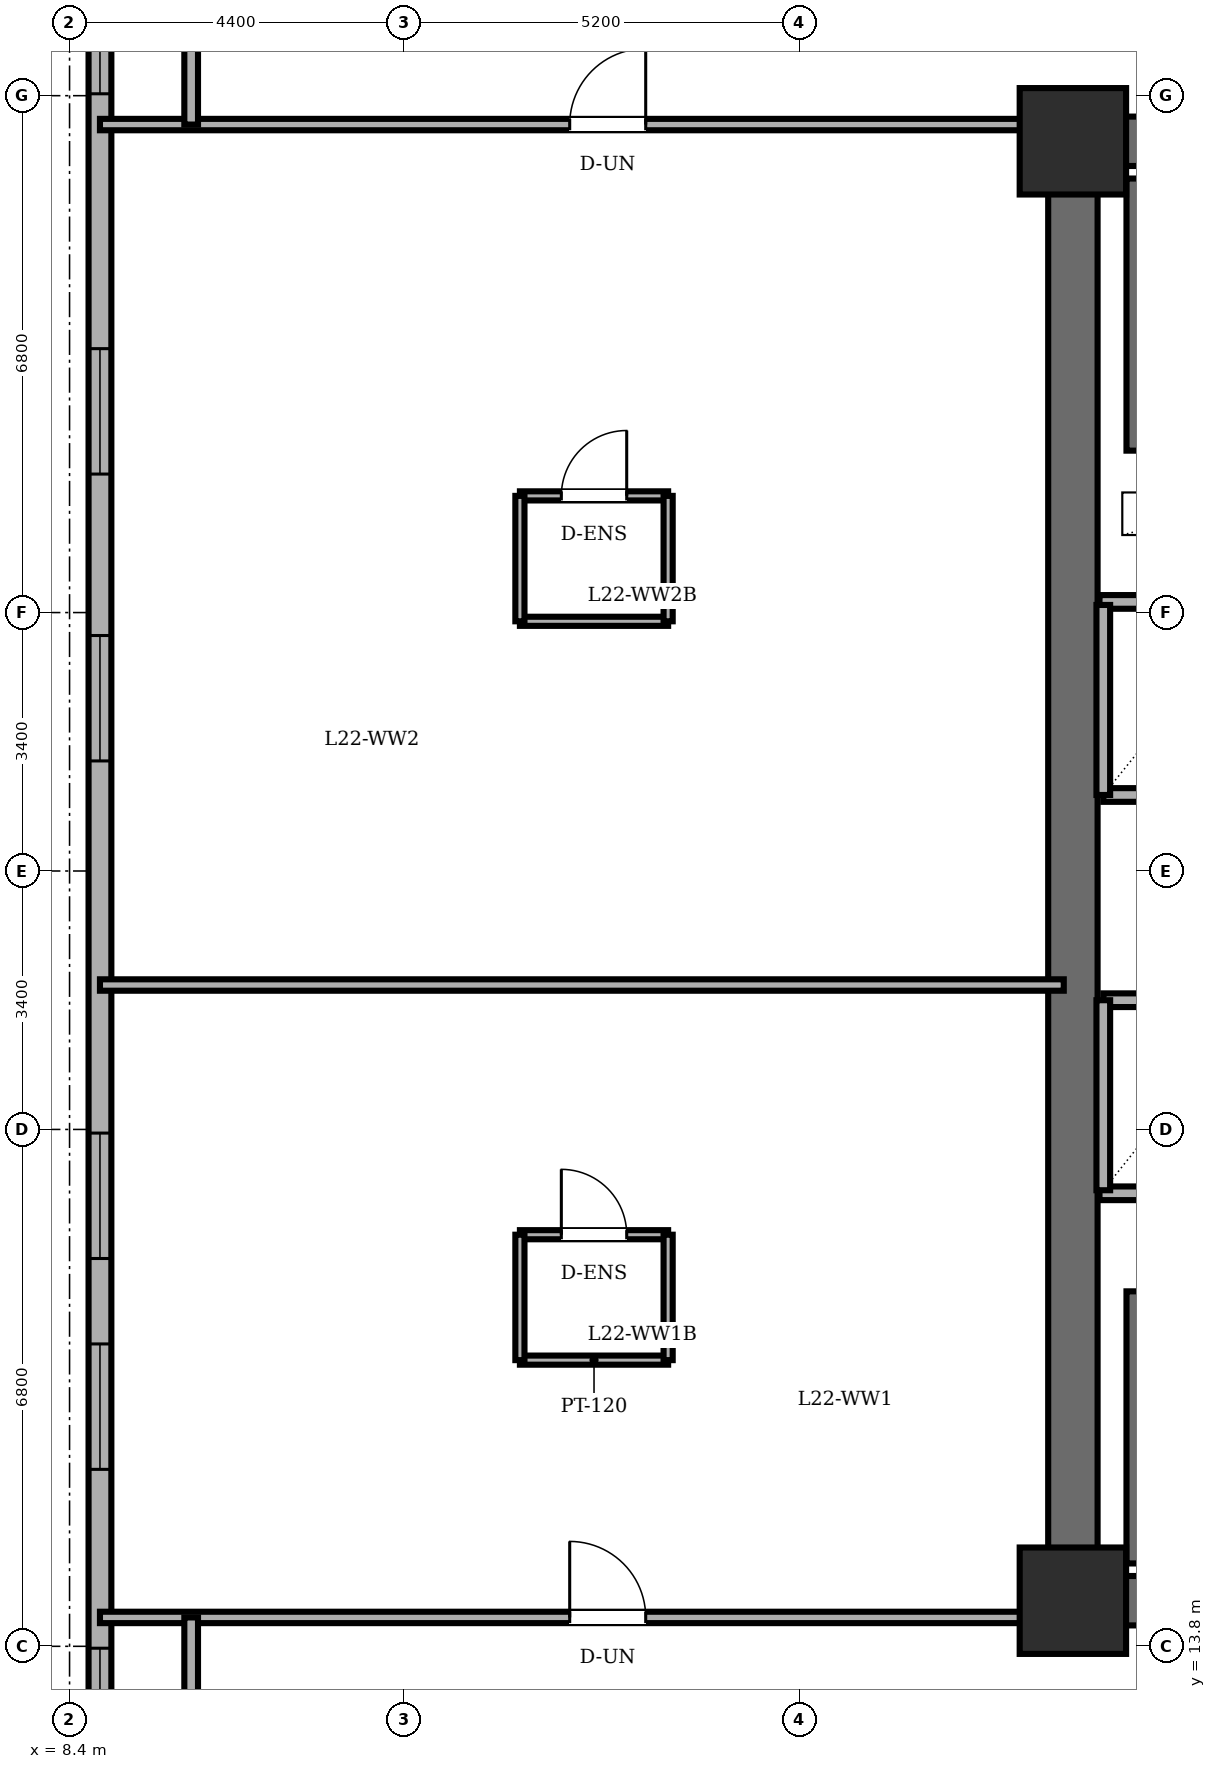
"""IFC4 building model, lengths in metres.
Left out: names, types, materials, properties, quantities, classifications, styles, units other than length and angle.
Written with IfcOpenShell. Run it as: python <this file> out.ifc"""

import sys

from ifc_helpers import new_model, si_unit, direction, frame, frame_2d, origin, origin_2d, place, context, subcontext, project, spatial, rectangle, extrude, element, fill, save


model = new_model("IFC4")
c1 = context("Model", 3, precision=1e-05, world=origin(), true_north=direction((0.0, 1.0)))
c2 = subcontext(c1, "Body", "Model", "MODEL_VIEW")
j1 = project(units=[si_unit("LENGTHUNIT", "METRE"), si_unit("PLANEANGLEUNIT", "RADIAN")], contexts=[c1])
p1 = place(None, origin())
s1 = spatial("IfcSite", under=j1, at=p1, CompositionType="ELEMENT")
p2 = place(p1, origin())
s2 = spatial("IfcBuilding", under=s1, at=p2, CompositionType="ELEMENT")
p3 = place(p2, frame((0.0, 0.0, 86.3)))
s3 = spatial("IfcBuildingStorey", under=s2, at=p3, CompositionType="ELEMENT", Elevation=86.3)
for number, where, z_axis, x_axis in (
    (1, (21.6, 14.4, 0.0), (0.0, 0.0, 1.0), (1.0, 0.0, 0.0)),
    (2, (21.6, 33.6, 0.0), (0.0, 0.0, 1.0), (1.0, 0.0, 0.0)),
):
    element("IfcColumn", number, at=place(p3, frame(where, z_axis=z_axis, x_axis=x_axis)), inside=s3, PredefinedType="COLUMN", context=c2, shape_type="SweptSolid", body=[
        extrude(rectangle(XDim=1.4, YDim=1.4, at=origin_2d()), origin(), (0.0, 0.0, 1.0), 3.6),
    ])
p4 = place(p3, frame((8.8, 38.2, 0.0), z_axis=(0.0, 0.0, 1.0), x_axis=(0.0, -1.0, 0.0)))
e3 = element("IfcWall", 3, at=p4, inside=s3, PredefinedType="SOLIDWALL", context=c2, shape_type="SweptSolid", body=[
    extrude(rectangle(XDim=28.4, YDim=0.3, at=frame_2d((14.2, 0.0))), origin(), (0.0, 0.0, 1.0), 3.4),
])
p5 = place(p4, frame((2.325, 0.0, 0.85)))
e4 = element("IfcOpeningElement", 4, at=p5, cuts=e3, PredefinedType="OPENING", context=c2, shape_type="SweptSolid", body=[
    extrude(rectangle(XDim=1.65, YDim=1.55, at=frame_2d((0.825, 0.775))), frame((0.0, 0.16, 0.0), z_axis=(0.0, -1.0, 0.0), x_axis=(1.0, 0.0, 0.0)), (0.0, 0.0, 1.0), 0.32),
])
p6 = place(p4, frame((7.328, 0.0, 0.85)))
e5 = element("IfcOpeningElement", 5, at=p6, cuts=e3, PredefinedType="OPENING", context=c2, shape_type="SweptSolid", body=[
    extrude(rectangle(XDim=1.65, YDim=1.55, at=frame_2d((0.825, 0.775))), frame((0.0, 0.16, 0.0), z_axis=(0.0, -1.0, 0.0), x_axis=(1.0, 0.0, 0.0)), (0.0, 0.0, 1.0), 0.32),
])
p7 = place(p4, frame((11.102, 0.0, 0.85)))
e6 = element("IfcOpeningElement", 6, at=p7, cuts=e3, PredefinedType="OPENING", context=c2, shape_type="SweptSolid", body=[
    extrude(rectangle(XDim=1.65, YDim=1.55, at=frame_2d((0.825, 0.775))), frame((0.0, 0.16, 0.0), z_axis=(0.0, -1.0, 0.0), x_axis=(1.0, 0.0, 0.0)), (0.0, 0.0, 1.0), 0.32),
])
p8 = place(p4, frame((17.648, 0.0, 0.85)))
e7 = element("IfcOpeningElement", 7, at=p8, cuts=e3, PredefinedType="OPENING", context=c2, shape_type="SweptSolid", body=[
    extrude(rectangle(XDim=1.65, YDim=1.55, at=frame_2d((0.825, 0.775))), frame((0.0, 0.16, 0.0), z_axis=(0.0, -1.0, 0.0), x_axis=(1.0, 0.0, 0.0)), (0.0, 0.0, 1.0), 0.32),
])
p9 = place(p4, frame((20.422, 0.0, 0.85)))
e8 = element("IfcOpeningElement", 8, at=p9, cuts=e3, PredefinedType="OPENING", context=c2, shape_type="SweptSolid", body=[
    extrude(rectangle(XDim=1.65, YDim=1.55, at=frame_2d((0.825, 0.775))), frame((0.0, 0.16, 0.0), z_axis=(0.0, -1.0, 0.0), x_axis=(1.0, 0.0, 0.0)), (0.0, 0.0, 1.0), 0.32),
])
p10 = place(p4, frame((24.425, 0.0, 0.85)))
e9 = element("IfcOpeningElement", 9, at=p10, cuts=e3, PredefinedType="OPENING", context=c2, shape_type="SweptSolid", body=[
    extrude(rectangle(XDim=1.65, YDim=1.55, at=frame_2d((0.825, 0.775))), frame((0.0, 0.16, 0.0), z_axis=(0.0, -1.0, 0.0), x_axis=(1.0, 0.0, 0.0)), (0.0, 0.0, 1.0), 0.32),
])
p11 = place(p3, frame((21.6, 14.4, 0.0), z_axis=(0.0, 0.0, 1.0), x_axis=(0.0, 1.0, 0.0)))
e10 = element("IfcWall", 10, at=p11, inside=s3, PredefinedType="SHEAR", context=c2, shape_type="SweptSolid", body=[
    extrude(rectangle(XDim=19.2, YDim=0.65, at=frame_2d((9.6, 0.0))), origin(), (0.0, 0.0, 1.0), 3.4),
])
for number, where, z_axis, x_axis in (
    (11, (21.6, 33.6, 0.0), (0.0, 0.0, 1.0), (1.0, 0.0, 0.0)),
    (12, (37.2, 14.4, 0.0), (0.0, 0.0, 1.0), (-1.0, 0.0, 0.0)),
):
    element("IfcWall", number, at=place(p3, frame(where, z_axis=z_axis, x_axis=x_axis)), inside=s3, PredefinedType="SHEAR", context=c2, shape_type="SweptSolid", body=[
        extrude(rectangle(XDim=15.6, YDim=0.65, at=frame_2d((7.8, 0.0))), origin(), (0.0, 0.0, 1.0), 3.4),
    ])
for number, where, z_axis, x_axis in (
    (13, (22.48, 29.53, 0.0), (0.0, 0.0, 1.0), (0.0, 1.0, 0.0)),
    (14, (22.48, 14.89, 0.0), (0.0, 0.0, 1.0), (0.0, 1.0, 0.0)),
):
    element("IfcWall", number, at=place(p3, frame(where, z_axis=z_axis, x_axis=x_axis)), inside=s3, PredefinedType="SOLIDWALL", context=c2, shape_type="SweptSolid", body=[
        extrude(rectangle(XDim=3.58, YDim=0.35, at=frame_2d((1.79, 0.0))), origin(), (0.0, 0.0, 1.0), 3.4),
    ])
p12 = place(p3, frame((21.95, 27.54, 0.0), z_axis=(0.0, 0.0, 1.0), x_axis=(1.0, 0.0, 0.0)))
e15 = element("IfcWall", 15, at=p12, inside=s3, PredefinedType="PARTITIONING", context=c2, shape_type="SweptSolid", body=[
    extrude(rectangle(XDim=10.56, YDim=0.18, at=frame_2d((5.28, 0.0))), origin(), (0.0, 0.0, 1.0), 3.4),
])
p13 = place(p3, frame((21.95, 19.76, 0.0), z_axis=(0.0, 0.0, 1.0), x_axis=(1.0, 0.0, 0.0)))
e16 = element("IfcWall", 16, at=p13, inside=s3, PredefinedType="PARTITIONING", context=c2, shape_type="SweptSolid", body=[
    extrude(rectangle(XDim=14.87, YDim=0.18, at=frame_2d((7.435, 0.0))), origin(), (0.0, 0.0, 1.0), 3.4),
])
p14 = place(p3, frame((24.02, 25.0, 0.0), z_axis=(0.0, 0.0, 1.0), x_axis=(-1.0, 0.0, 0.0)))
e17 = element("IfcWall", 17, at=p14, inside=s3, PredefinedType="PARTITIONING", context=c2, shape_type="SweptSolid", body=[
    extrude(rectangle(XDim=2.02, YDim=0.18, at=frame_2d((1.01, 0.0))), origin(), (0.0, 0.0, 1.0), 3.4),
])
p15 = place(p3, frame((22.0, 27.5, 0.0), z_axis=(0.0, 0.0, 1.0), x_axis=(0.0, -1.0, 0.0)))
e18 = element("IfcWall", 18, at=p15, inside=s3, PredefinedType="PARTITIONING", context=c2, shape_type="SweptSolid", body=[
    extrude(rectangle(XDim=2.5, YDim=0.18, at=frame_2d((1.25, 0.0))), origin(), (0.0, 0.0, 1.0), 3.4),
])
p16 = place(p3, frame((22.0, 22.3, 0.0), z_axis=(0.0, 0.0, 1.0), x_axis=(1.0, 0.0, 0.0)))
e19 = element("IfcWall", 19, at=p16, inside=s3, PredefinedType="PARTITIONING", context=c2, shape_type="SweptSolid", body=[
    extrude(rectangle(XDim=2.0, YDim=0.18, at=frame_2d((1.0, 0.0))), origin(), (0.0, 0.0, 1.0), 3.4),
])
p17 = place(p3, frame((22.0, 22.3, 0.0), z_axis=(0.0, 0.0, 1.0), x_axis=(0.0, -1.0, 0.0)))
e20 = element("IfcWall", 20, at=p17, inside=s3, PredefinedType="PARTITIONING", context=c2, shape_type="SweptSolid", body=[
    extrude(rectangle(XDim=2.5, YDim=0.18, at=frame_2d((1.25, 0.0))), origin(), (0.0, 0.0, 1.0), 3.4),
])
p18 = place(p3, frame((14.325, 19.215, 0.0), z_axis=(0.0, 0.0, 1.0), x_axis=(1.0, 0.0, 0.0)))
e21 = element("IfcWall", 21, at=p18, inside=s3, PredefinedType="PARTITIONING", context=c2, shape_type="SweptSolid", body=[
    extrude(rectangle(XDim=1.95, YDim=0.12, at=frame_2d((0.975, 0.0))), origin(), (0.0, 0.0, 1.0), 3.4),
])
p19 = place(p18, frame((0.545, 0.0, 0.0)))
e22 = element("IfcOpeningElement", 22, at=p19, cuts=e21, PredefinedType="OPENING", context=c2, shape_type="SweptSolid", body=[
    extrude(rectangle(XDim=0.86, YDim=2.1, at=frame_2d((0.43, 1.05))), frame((0.0, 0.07, 0.0), z_axis=(0.0, -1.0, 0.0), x_axis=(1.0, 0.0, 0.0)), (0.0, 0.0, 1.0), 0.14),
])
p20 = place(p3, frame((16.275, 17.565, 0.0), z_axis=(0.0, 0.0, 1.0), x_axis=(-1.0, 0.0, 0.0)))
e23 = element("IfcWall", 23, at=p20, inside=s3, PredefinedType="PARTITIONING", context=c2, shape_type="SweptSolid", body=[
    extrude(rectangle(XDim=1.95, YDim=0.12, at=frame_2d((0.975, 0.0))), origin(), (0.0, 0.0, 1.0), 3.4),
])
for number, where, z_axis, x_axis in (
    (24, (14.325, 19.215, 0.0), (0.0, 0.0, 1.0), (0.0, -1.0, 0.0)),
    (25, (16.275, 17.565, 0.0), (0.0, 0.0, 1.0), (0.0, 1.0, 0.0)),
):
    element("IfcWall", number, at=place(p3, frame(where, z_axis=z_axis, x_axis=x_axis)), inside=s3, PredefinedType="PARTITIONING", context=c2, shape_type="SweptSolid", body=[
        extrude(rectangle(XDim=1.65, YDim=0.12, at=frame_2d((0.825, 0.0))), origin(), (0.0, 0.0, 1.0), 3.4),
    ])
p21 = place(p3, frame((14.325, 28.935, 0.0), z_axis=(0.0, 0.0, 1.0), x_axis=(1.0, 0.0, 0.0)))
e26 = element("IfcWall", 26, at=p21, inside=s3, PredefinedType="PARTITIONING", context=c2, shape_type="SweptSolid", body=[
    extrude(rectangle(XDim=1.95, YDim=0.12, at=frame_2d((0.975, 0.0))), origin(), (0.0, 0.0, 1.0), 3.4),
])
p22 = place(p21, frame((0.545, 0.0, 0.0)))
e27 = element("IfcOpeningElement", 27, at=p22, cuts=e26, PredefinedType="OPENING", context=c2, shape_type="SweptSolid", body=[
    extrude(rectangle(XDim=0.86, YDim=2.1, at=frame_2d((0.43, 1.05))), frame((0.0, 0.07, 0.0), z_axis=(0.0, -1.0, 0.0), x_axis=(1.0, 0.0, 0.0)), (0.0, 0.0, 1.0), 0.14),
])
p23 = place(p3, frame((16.275, 27.285, 0.0), z_axis=(0.0, 0.0, 1.0), x_axis=(-1.0, 0.0, 0.0)))
e28 = element("IfcWall", 28, at=p23, inside=s3, PredefinedType="PARTITIONING", context=c2, shape_type="SweptSolid", body=[
    extrude(rectangle(XDim=1.95, YDim=0.12, at=frame_2d((0.975, 0.0))), origin(), (0.0, 0.0, 1.0), 3.4),
])
for number, where, z_axis, x_axis in (
    (29, (14.325, 28.935, 0.0), (0.0, 0.0, 1.0), (0.0, -1.0, 0.0)),
    (30, (16.275, 27.285, 0.0), (0.0, 0.0, 1.0), (0.0, 1.0, 0.0)),
):
    element("IfcWall", number, at=place(p3, frame(where, z_axis=z_axis, x_axis=x_axis)), inside=s3, PredefinedType="PARTITIONING", context=c2, shape_type="SweptSolid", body=[
        extrude(rectangle(XDim=1.65, YDim=0.12, at=frame_2d((0.825, 0.0))), origin(), (0.0, 0.0, 1.0), 3.4),
    ])
p24 = place(p3, frame((8.8, 14.18, 0.0), z_axis=(0.0, 0.0, 1.0), x_axis=(1.0, 0.0, 0.0)))
e31 = element("IfcWall", 31, at=p24, inside=s3, PredefinedType="PARTITIONING", context=c2, shape_type="SweptSolid", body=[
    extrude(rectangle(XDim=12.68, YDim=0.15, at=frame_2d((6.34, 0.0))), origin(), (0.0, 0.0, 1.0), 3.4),
])
p25 = place(p24, frame((6.18, 0.0, 0.0)))
e32 = element("IfcOpeningElement", 32, at=p25, cuts=e31, PredefinedType="OPENING", context=c2, shape_type="SweptSolid", body=[
    extrude(rectangle(XDim=1.0, YDim=2.15, at=frame_2d((0.5, 1.075))), frame((0.0, 0.085, 0.0), z_axis=(0.0, -1.0, 0.0), x_axis=(1.0, 0.0, 0.0)), (0.0, 0.0, 1.0), 0.17),
])
p26 = place(p3, frame((8.8, 22.5, 0.0), z_axis=(0.0, 0.0, 1.0), x_axis=(1.0, 0.0, 0.0)))
e33 = element("IfcWall", 33, at=p26, inside=s3, PredefinedType="PARTITIONING", context=c2, shape_type="SweptSolid", body=[
    extrude(rectangle(XDim=12.68, YDim=0.15, at=frame_2d((6.34, 0.0))), origin(), (0.0, 0.0, 1.0), 3.4),
])
p27 = place(p3, frame((8.8, 33.82, 0.0), z_axis=(0.0, 0.0, 1.0), x_axis=(1.0, 0.0, 0.0)))
e34 = element("IfcWall", 34, at=p27, inside=s3, PredefinedType="PARTITIONING", context=c2, shape_type="SweptSolid", body=[
    extrude(rectangle(XDim=12.68, YDim=0.15, at=frame_2d((6.34, 0.0))), origin(), (0.0, 0.0, 1.0), 3.4),
])
p28 = place(p27, frame((6.18, 0.0, 0.0)))
e35 = element("IfcOpeningElement", 35, at=p28, cuts=e34, PredefinedType="OPENING", context=c2, shape_type="SweptSolid", body=[
    extrude(rectangle(XDim=1.0, YDim=2.15, at=frame_2d((0.5, 1.075))), frame((0.0, 0.085, 0.0), z_axis=(0.0, -1.0, 0.0), x_axis=(1.0, 0.0, 0.0)), (0.0, 0.0, 1.0), 0.17),
])
for number, where, z_axis, x_axis in (
    (36, (10.0, 11.72, 0.0), (0.0, 0.0, 1.0), (0.0, 1.0, 0.0)),
    (37, (10.0, 33.82, 0.0), (0.0, 0.0, 1.0), (0.0, 1.0, 0.0)),
):
    element("IfcWall", number, at=place(p3, frame(where, z_axis=z_axis, x_axis=x_axis)), inside=s3, PredefinedType="PARTITIONING", context=c2, shape_type="SweptSolid", body=[
        extrude(rectangle(XDim=2.46, YDim=0.18, at=frame_2d((1.23, 0.0))), origin(), (0.0, 0.0, 1.0), 3.4),
    ])
p29 = place(p5, origin())
e38 = element("IfcWindow", 38, at=p29, inside=s3, PartitioningType="DOUBLE_PANEL_VERTICAL", PredefinedType="WINDOW", context=c2, shape_type="SweptSolid", body=[
    extrude(rectangle(XDim=1.65, YDim=1.55, at=frame_2d((0.825, 0.775))), frame((0.0, 0.03, 0.0), z_axis=(0.0, -1.0, 0.0), x_axis=(1.0, 0.0, 0.0)), (0.0, 0.0, 1.0), 0.06),
])
fill(e4, e38)
p30 = place(p6, origin())
e39 = element("IfcWindow", 39, at=p30, inside=s3, PartitioningType="DOUBLE_PANEL_VERTICAL", PredefinedType="WINDOW", context=c2, shape_type="SweptSolid", body=[
    extrude(rectangle(XDim=1.65, YDim=1.55, at=frame_2d((0.825, 0.775))), frame((0.0, 0.03, 0.0), z_axis=(0.0, -1.0, 0.0), x_axis=(1.0, 0.0, 0.0)), (0.0, 0.0, 1.0), 0.06),
])
fill(e5, e39)
p31 = place(p7, origin())
e40 = element("IfcWindow", 40, at=p31, inside=s3, PartitioningType="DOUBLE_PANEL_VERTICAL", PredefinedType="WINDOW", context=c2, shape_type="SweptSolid", body=[
    extrude(rectangle(XDim=1.65, YDim=1.55, at=frame_2d((0.825, 0.775))), frame((0.0, 0.03, 0.0), z_axis=(0.0, -1.0, 0.0), x_axis=(1.0, 0.0, 0.0)), (0.0, 0.0, 1.0), 0.06),
])
fill(e6, e40)
p32 = place(p8, origin())
e41 = element("IfcWindow", 41, at=p32, inside=s3, PartitioningType="DOUBLE_PANEL_VERTICAL", PredefinedType="WINDOW", context=c2, shape_type="SweptSolid", body=[
    extrude(rectangle(XDim=1.65, YDim=1.55, at=frame_2d((0.825, 0.775))), frame((0.0, 0.03, 0.0), z_axis=(0.0, -1.0, 0.0), x_axis=(1.0, 0.0, 0.0)), (0.0, 0.0, 1.0), 0.06),
])
fill(e7, e41)
p33 = place(p9, origin())
e42 = element("IfcWindow", 42, at=p33, inside=s3, PartitioningType="DOUBLE_PANEL_VERTICAL", PredefinedType="WINDOW", context=c2, shape_type="SweptSolid", body=[
    extrude(rectangle(XDim=1.65, YDim=1.55, at=frame_2d((0.825, 0.775))), frame((0.0, 0.03, 0.0), z_axis=(0.0, -1.0, 0.0), x_axis=(1.0, 0.0, 0.0)), (0.0, 0.0, 1.0), 0.06),
])
fill(e8, e42)
p34 = place(p10, origin())
e43 = element("IfcWindow", 43, at=p34, inside=s3, PartitioningType="DOUBLE_PANEL_VERTICAL", PredefinedType="WINDOW", context=c2, shape_type="SweptSolid", body=[
    extrude(rectangle(XDim=1.65, YDim=1.55, at=frame_2d((0.825, 0.775))), frame((0.0, 0.03, 0.0), z_axis=(0.0, -1.0, 0.0), x_axis=(1.0, 0.0, 0.0)), (0.0, 0.0, 1.0), 0.06),
])
fill(e9, e43)
p35 = place(p19, origin())
e44 = element("IfcDoor", 44, at=p35, inside=s3, OperationType="SINGLE_SWING_LEFT", PredefinedType="DOOR", context=c2, shape_type="SweptSolid", body=[
    extrude(rectangle(XDim=0.86, YDim=2.1, at=frame_2d((0.43, 1.05))), frame((0.0, 0.025, 0.0), z_axis=(0.0, -1.0, 0.0), x_axis=(1.0, 0.0, 0.0)), (0.0, 0.0, 1.0), 0.05),
])
fill(e22, e44)
p36 = place(p22, origin())
e45 = element("IfcDoor", 45, at=p36, inside=s3, OperationType="SINGLE_SWING_RIGHT", PredefinedType="DOOR", context=c2, shape_type="SweptSolid", body=[
    extrude(rectangle(XDim=0.86, YDim=2.1, at=frame_2d((0.43, 1.05))), frame((0.0, 0.025, 0.0), z_axis=(0.0, -1.0, 0.0), x_axis=(1.0, 0.0, 0.0)), (0.0, 0.0, 1.0), 0.05),
])
fill(e27, e45)
p37 = place(p25, origin())
e46 = element("IfcDoor", 46, at=p37, inside=s3, OperationType="SINGLE_SWING_LEFT", PredefinedType="DOOR", context=c2, shape_type="SweptSolid", body=[
    extrude(rectangle(XDim=1.0, YDim=2.15, at=frame_2d((0.5, 1.075))), frame((0.0, 0.025, 0.0), z_axis=(0.0, -1.0, 0.0), x_axis=(1.0, 0.0, 0.0)), (0.0, 0.0, 1.0), 0.05),
])
fill(e32, e46)
p38 = place(p28, origin())
e47 = element("IfcDoor", 47, at=p38, inside=s3, OperationType="SINGLE_SWING_RIGHT", PredefinedType="DOOR", context=c2, shape_type="SweptSolid", body=[
    extrude(rectangle(XDim=1.0, YDim=2.15, at=frame_2d((0.5, 1.075))), frame((0.0, 0.025, 0.0), z_axis=(0.0, -1.0, 0.0), x_axis=(1.0, 0.0, 0.0)), (0.0, 0.0, 1.0), 0.05),
])
fill(e35, e47)
save(model, sys.argv[1])
